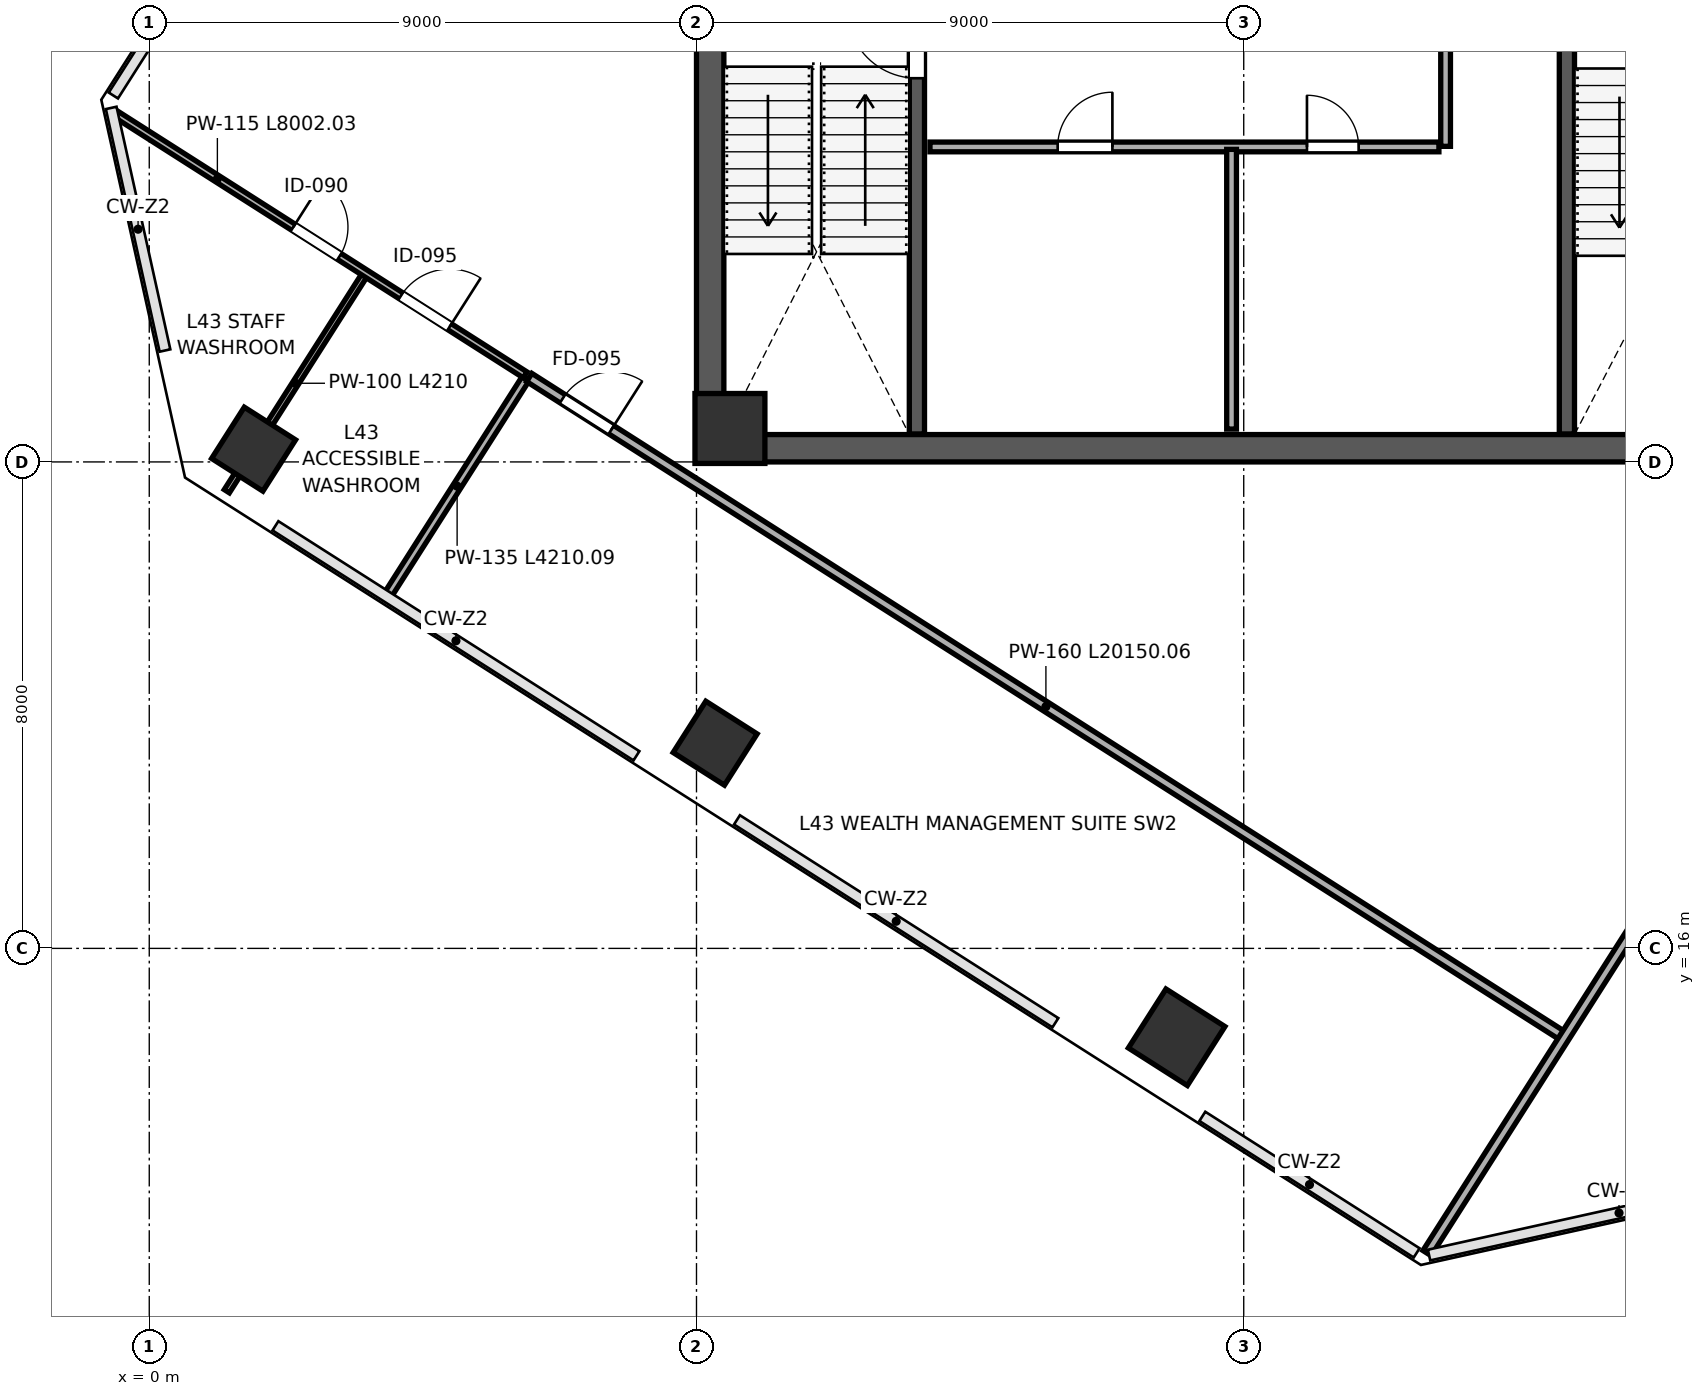
"""IFC4 building model, lengths in metres.
Left out: names, types, materials, properties, quantities, classifications, styles, units other than length and angle.
Written with IfcOpenShell. Run it as: python <this file> out.ifc"""

import sys

from ifc_helpers import new_model, si_unit, direction, frame, frame_2d, origin, origin_2d, place, context, subcontext, project, spatial, rectangle, extrude, clip, halfspace, source, transform, mapped, element, fill, save


model = new_model("IFC4")
c1 = context("Model", 3, precision=1e-05, world=origin(), true_north=direction((0.0, 1.0)))
c2 = subcontext(c1, "Body", "Model", "MODEL_VIEW")
j1 = project(units=[si_unit("LENGTHUNIT", "METRE"), si_unit("PLANEANGLEUNIT", "RADIAN")], contexts=[c1])
p1 = place(None, origin())
s1 = spatial("IfcSite", under=j1, at=p1, CompositionType="ELEMENT")
p2 = place(p1, origin())
s2 = spatial("IfcBuilding", under=s1, at=p2, CompositionType="ELEMENT")
p3 = place(p2, frame((0.0, 0.0, 191.8)))
s3 = spatial("IfcBuildingStorey", under=s2, at=p3, CompositionType="ELEMENT", Elevation=191.8)
m1 = source(origin(), c2, "Body", "SweptSolid", [
    extrude(rectangle(XDim=1.15, YDim=1.15, at=origin_2d()), origin(), (0.0, 0.0, 1.0), 4.198),
])
p4 = place(p3, frame((9.55, 24.55, 0.001), z_axis=(0.0, 0.0, 1.0), x_axis=(1.0, 0.0, 0.0)))
e1 = element("IfcColumn", 1, at=p4, inside=s3, PredefinedType="COLUMN", context=c2, shape_type="MappedRepresentation", body=[
    mapped(m1, transform((0.0, 0.0, 0.0), scale=1.0)),
])
p5 = place(p3, frame((1.716, 24.21, 0.0), z_axis=(-0.074641047873, 0.202353867427, 0.976463837687), x_axis=(0.972844329493, -0.200360876528, 0.115885416387)))
e2 = element("IfcColumn", 2, at=p5, inside=s3, PredefinedType="COLUMN", context=c2, shape_type="Clipping", body=[
    clip(clip(extrude(rectangle(XDim=1.0, YDim=1.0, at=origin_2d()), origin(), (0.0, 0.0, 1.0), 4.301), halfspace(frame((0.0, 0.0, 0.153), z_axis=(0.0, 0.0, -1.0), x_axis=(1.0, 0.0, 0.0)), False)), halfspace(frame((0.0, 0.0, 4.148), z_axis=(0.0, 0.0, 1.0), x_axis=(1.0, 0.0, 0.0)), False)),
])
p6 = place(p3, frame((9.307, 19.374, 0.0), z_axis=(-0.12626785012, 0.127411580647, 0.983779812327), x_axis=(0.971127246799, 0.218225991458, 0.096380948205)))
e3 = element("IfcColumn", 3, at=p6, inside=s3, PredefinedType="COLUMN", context=c2, shape_type="Clipping", body=[
    clip(clip(extrude(rectangle(XDim=1.0, YDim=1.0, at=origin_2d()), origin(), (0.0, 0.0, 1.0), 4.269), halfspace(frame((0.0, 0.0, 0.127), z_axis=(0.0, 0.0, -1.0), x_axis=(1.0, 0.0, 0.0)), False)), halfspace(frame((0.0, 0.0, 4.143), z_axis=(0.0, 0.0, 1.0), x_axis=(1.0, 0.0, 0.0)), False)),
])
p7 = place(p3, frame((16.897, 14.539, 0.0), z_axis=(-0.177225978998, 0.050848201582, 0.982855743619), x_axis=(0.740203149213, 0.665045390151, 0.099065266036)))
e4 = element("IfcColumn", 4, at=p7, inside=s3, PredefinedType="COLUMN", context=c2, shape_type="Clipping", body=[
    clip(clip(extrude(rectangle(XDim=1.15, YDim=1.15, at=origin_2d()), origin(), (0.0, 0.0, 1.0), 4.273), halfspace(frame((0.0, 0.0, 0.15), z_axis=(0.0, 0.0, -1.0), x_axis=(1.0, 0.0, 0.0)), False)), halfspace(frame((0.0, 0.0, 4.124), z_axis=(0.0, 0.0, 1.0), x_axis=(1.0, 0.0, 0.0)), False)),
])
p8 = place(p3, frame((9.225, 24.45, 0.0), z_axis=(0.0, 0.0, 1.0), x_axis=(0.0, 1.0, 0.0)))
e5 = element("IfcWall", 5, at=p8, inside=s3, PredefinedType="SHEAR", context=c2, shape_type="SweptSolid", body=[
    extrude(rectangle(XDim=15.1, YDim=0.45, at=frame_2d((7.55, 0.0))), origin(), (0.0, 0.0, 1.0), 3.96),
])
p9 = place(p3, frame((9.0, 24.225, 0.0), z_axis=(0.0, 0.0, 1.0), x_axis=(1.0, 0.0, 0.0)))
e6 = element("IfcWall", 6, at=p9, inside=s3, PredefinedType="SHEAR", context=c2, shape_type="SweptSolid", body=[
    extrude(rectangle(XDim=18.0, YDim=0.45, at=frame_2d((9.0, 0.0))), origin(), (0.0, 0.0, 1.0), 3.96),
])
p10 = place(p3, frame((12.625, 24.46, 0.0), z_axis=(0.0, 0.0, 1.0), x_axis=(0.0, 1.0, 0.0)))
e7 = element("IfcWall", 7, at=p10, inside=s3, PredefinedType="SHEAR", context=c2, shape_type="SweptSolid", body=[
    extrude(rectangle(XDim=7.49, YDim=0.25, at=frame_2d((3.745, 0.0))), origin(), (0.0, 0.0, 1.0), 3.96),
])
p11 = place(p10, frame((5.85, 0.0, 0.0)))
e8 = element("IfcOpeningElement", 8, at=p11, cuts=e7, PredefinedType="OPENING", context=c2, shape_type="SweptSolid", body=[
    extrude(rectangle(XDim=1.15, YDim=2.2, at=frame_2d((0.575, 1.1))), frame((0.0, 0.135, 0.0), z_axis=(0.0, -1.0, 0.0), x_axis=(1.0, 0.0, 0.0)), (0.0, 0.0, 1.0), 0.27),
])
p12 = place(p3, frame((23.315, 24.46, 0.0), z_axis=(0.0, 0.0, 1.0), x_axis=(0.0, 1.0, 0.0)))
e9 = element("IfcWall", 9, at=p12, inside=s3, PredefinedType="SHEAR", context=c2, shape_type="SweptSolid", body=[
    extrude(rectangle(XDim=7.49, YDim=0.25, at=frame_2d((3.745, 0.0))), origin(), (0.0, 0.0, 1.0), 3.96),
])
p13 = place(p3, frame((12.84, 29.18, 0.0), z_axis=(0.0, 0.0, 1.0), x_axis=(1.0, 0.0, 0.0)))
e10 = element("IfcWall", 10, at=p13, inside=s3, PredefinedType="PARTITIONING", context=c2, shape_type="SweptSolid", body=[
    extrude(rectangle(XDim=8.37, YDim=0.16, at=frame_2d((4.185, 0.0))), origin(), (0.0, 0.0, 1.0), 3.96),
])
p14 = place(p13, frame((2.1, 0.0, 0.0)))
e11 = element("IfcOpeningElement", 11, at=p14, cuts=e10, PredefinedType="OPENING", context=c2, shape_type="SweptSolid", body=[
    extrude(rectangle(XDim=0.9, YDim=2.15, at=frame_2d((0.45, 1.075))), frame((0.0, 0.09, 0.0), z_axis=(0.0, -1.0, 0.0), x_axis=(1.0, 0.0, 0.0)), (0.0, 0.0, 1.0), 0.18),
])
p15 = place(p13, frame((6.2, 0.0, 0.0)))
e12 = element("IfcOpeningElement", 12, at=p15, cuts=e10, PredefinedType="OPENING", context=c2, shape_type="SweptSolid", body=[
    extrude(rectangle(XDim=0.85, YDim=2.1, at=frame_2d((0.425, 1.05))), frame((0.0, 0.09, 0.0), z_axis=(0.0, -1.0, 0.0), x_axis=(1.0, 0.0, 0.0)), (0.0, 0.0, 1.0), 0.18),
])
p16 = place(p3, frame((17.8, 24.54, 0.0), z_axis=(0.0, 0.0, 1.0), x_axis=(0.0, 1.0, 0.0)))
e13 = element("IfcWall", 13, at=p16, inside=s3, PredefinedType="PARTITIONING", context=c2, shape_type="SweptSolid", body=[
    extrude(rectangle(XDim=4.6, YDim=0.16, at=frame_2d((2.3, 0.0))), origin(), (0.0, 0.0, 1.0), 3.96),
])
p17 = place(p3, frame((21.32, 29.19, 0.0), z_axis=(0.0, 0.0, 1.0), x_axis=(0.0, 1.0, 0.0)))
e14 = element("IfcWall", 14, at=p17, inside=s3, PredefinedType="PARTITIONING", context=c2, shape_type="SweptSolid", body=[
    extrude(rectangle(XDim=2.92, YDim=0.16, at=frame_2d((1.46, 0.0))), origin(), (0.0, 0.0, 1.0), 3.96),
])
p18 = place(p3, frame((1.275, 23.518, 0.0), z_axis=(0.0, 0.0, 1.0), x_axis=(0.537318174822, 0.843379617376, 0.0)))
e15 = element("IfcWall", 15, at=p18, inside=s3, PredefinedType="PARTITIONING", context=c2, shape_type="SweptSolid", body=[
    extrude(rectangle(XDim=4.21, YDim=0.1, at=frame_2d((2.105, 0.0))), origin(), (0.0, 0.0, 1.0), 3.195),
])
p19 = place(p3, frame((3.932, 21.826, 0.0), z_axis=(0.0, 0.0, 1.0), x_axis=(0.537250649862, 0.84342263381, 0.0)))
e16 = element("IfcWall", 16, at=p19, inside=s3, PredefinedType="PARTITIONING", context=c2, shape_type="SweptSolid", body=[
    extrude(rectangle(XDim=4.21, YDim=0.135, at=frame_2d((2.105, 0.0))), origin(), (0.0, 0.0, 1.0), 3.195),
])
p20 = place(p3, frame((-0.567, 29.731, 0.0), z_axis=(0.0, 0.0, 1.0), x_axis=(0.843398817975, -0.537288036195, 0.0)))
e17 = element("IfcWall", 17, at=p20, inside=s3, PredefinedType="PARTITIONING", context=c2, shape_type="SweptSolid", body=[
    extrude(rectangle(XDim=8.002, YDim=0.115, at=frame_2d((4.001, 0.0))), origin(), (0.0, 0.0, 1.0), 3.96),
])
p21 = place(p20, frame((3.48, 0.0, 0.0)))
e18 = element("IfcOpeningElement", 18, at=p21, cuts=e17, PredefinedType="OPENING", context=c2, shape_type="SweptSolid", body=[
    extrude(rectangle(XDim=0.9, YDim=2.15, at=frame_2d((0.45, 1.075))), frame((0.0, 0.067, 0.0), z_axis=(0.0, -1.0, 0.0), x_axis=(1.0, 0.0, 0.0)), (0.0, 0.0, 1.0), 0.135),
])
p22 = place(p20, frame((5.58, 0.0, 0.0)))
e19 = element("IfcOpeningElement", 19, at=p22, cuts=e17, PredefinedType="OPENING", context=c2, shape_type="SweptSolid", body=[
    extrude(rectangle(XDim=0.95, YDim=2.15, at=frame_2d((0.475, 1.075))), frame((0.0, 0.067, 0.0), z_axis=(0.0, -1.0, 0.0), x_axis=(1.0, 0.0, 0.0)), (0.0, 0.0, 1.0), 0.135),
])
p23 = place(p3, frame((6.25, 25.389, 0.0), z_axis=(0.0, 0.0, 1.0), x_axis=(0.843390478307, -0.537301127024, 0.0)))
e20 = element("IfcWall", 20, at=p23, inside=s3, PredefinedType="PARTITIONING", context=c2, shape_type="SweptSolid", body=[
    extrude(rectangle(XDim=20.15, YDim=0.16, at=frame_2d((10.075, 0.0))), origin(), (0.0, 0.0, 1.0), 3.96),
])
p24 = place(p23, frame((0.65, 0.0, 0.0)))
e21 = element("IfcOpeningElement", 21, at=p24, cuts=e20, PredefinedType="OPENING", context=c2, shape_type="SweptSolid", body=[
    extrude(rectangle(XDim=0.95, YDim=2.15, at=frame_2d((0.475, 1.075))), frame((0.0, 0.09, 0.0), z_axis=(0.0, -1.0, 0.0), x_axis=(1.0, 0.0, 0.0)), (0.0, 0.0, 1.0), 0.18),
])
p25 = place(p3, frame((21.014, 10.988, 0.0), z_axis=(0.0, 0.0, 1.0), x_axis=(0.537301260837, 0.843390393058, 0.0)))
e22 = element("IfcWall", 22, at=p25, inside=s3, PredefinedType="PARTITIONING", context=c2, shape_type="SweptSolid", body=[
    extrude(rectangle(XDim=14.542, YDim=0.16, at=frame_2d((7.271, 0.0))), origin(), (0.0, 0.0, 1.0), 3.96),
])
m2 = source(origin(), c2, "Body", "SweptSolid", [
    extrude(rectangle(XDim=1.15, YDim=2.2, at=frame_2d((0.575, 1.1))), frame((0.0, 0.025, 0.0), z_axis=(0.0, -1.0, 0.0), x_axis=(1.0, 0.0, 0.0)), (0.0, 0.0, 1.0), 0.05),
])
p26 = place(p11, origin())
e23 = element("IfcDoor", 23, at=p26, inside=s3, OperationType="SINGLE_SWING_RIGHT", PredefinedType="DOOR", context=c2, shape_type="MappedRepresentation", body=[
    mapped(m2, transform((0.0, 0.0, 0.0), scale=1.0)),
])
fill(e8, e23)
m3 = source(origin(), c2, "Body", "SweptSolid", [
    extrude(rectangle(XDim=0.9, YDim=2.15, at=frame_2d((0.45, 1.075))), frame((0.0, 0.025, 0.0), z_axis=(0.0, -1.0, 0.0), x_axis=(1.0, 0.0, 0.0)), (0.0, 0.0, 1.0), 0.05),
])
p27 = place(p14, origin())
e24 = element("IfcDoor", 24, at=p27, inside=s3, OperationType="SINGLE_SWING_RIGHT", PredefinedType="DOOR", context=c2, shape_type="MappedRepresentation", body=[
    mapped(m3, transform((0.0, 0.0, 0.0), scale=1.0)),
])
fill(e11, e24)
m4 = source(origin(), c2, "Body", "SweptSolid", [
    extrude(rectangle(XDim=0.85, YDim=2.1, at=frame_2d((0.425, 1.05))), frame((0.0, 0.025, 0.0), z_axis=(0.0, -1.0, 0.0), x_axis=(1.0, 0.0, 0.0)), (0.0, 0.0, 1.0), 0.05),
])
p28 = place(p15, origin())
e25 = element("IfcDoor", 25, at=p28, inside=s3, OperationType="SINGLE_SWING_LEFT", PredefinedType="DOOR", context=c2, shape_type="MappedRepresentation", body=[
    mapped(m4, transform((0.0, 0.0, 0.0), scale=1.0)),
])
fill(e12, e25)
m5 = source(origin(), c2, "Body", "SweptSolid", [
    extrude(rectangle(XDim=0.9, YDim=2.15, at=frame_2d((0.45, 1.075))), frame((0.0, 0.025, 0.0), z_axis=(0.0, -1.0, 0.0), x_axis=(1.0, 0.0, 0.0)), (0.0, 0.0, 1.0), 0.05),
])
p29 = place(p21, origin())
e26 = element("IfcDoor", 26, at=p29, inside=s3, OperationType="SINGLE_SWING_LEFT", PredefinedType="DOOR", context=c2, shape_type="MappedRepresentation", body=[
    mapped(m5, transform((0.0, 0.0, 0.0), scale=1.0)),
])
fill(e18, e26)
m6 = source(origin(), c2, "Body", "SweptSolid", [
    extrude(rectangle(XDim=0.95, YDim=2.15, at=frame_2d((0.475, 1.075))), frame((0.0, 0.025, 0.0), z_axis=(0.0, -1.0, 0.0), x_axis=(1.0, 0.0, 0.0)), (0.0, 0.0, 1.0), 0.05),
])
p30 = place(p22, origin())
e27 = element("IfcDoor", 27, at=p30, inside=s3, OperationType="SINGLE_SWING_RIGHT", PredefinedType="DOOR", context=c2, shape_type="MappedRepresentation", body=[
    mapped(m6, transform((0.0, 0.0, 0.0), scale=1.0)),
])
fill(e19, e27)
m7 = source(origin(), c2, "Body", "SweptSolid", [
    extrude(rectangle(XDim=0.95, YDim=2.15, at=frame_2d((0.475, 1.075))), frame((0.0, 0.025, 0.0), z_axis=(0.0, -1.0, 0.0), x_axis=(1.0, 0.0, 0.0)), (0.0, 0.0, 1.0), 0.05),
])
p31 = place(p24, origin())
e28 = element("IfcDoor", 28, at=p31, inside=s3, OperationType="SINGLE_SWING_RIGHT", PredefinedType="DOOR", context=c2, shape_type="MappedRepresentation", body=[
    mapped(m7, transform((0.0, 0.0, 0.0), scale=1.0)),
])
fill(e21, e28)
save(model, sys.argv[1])
